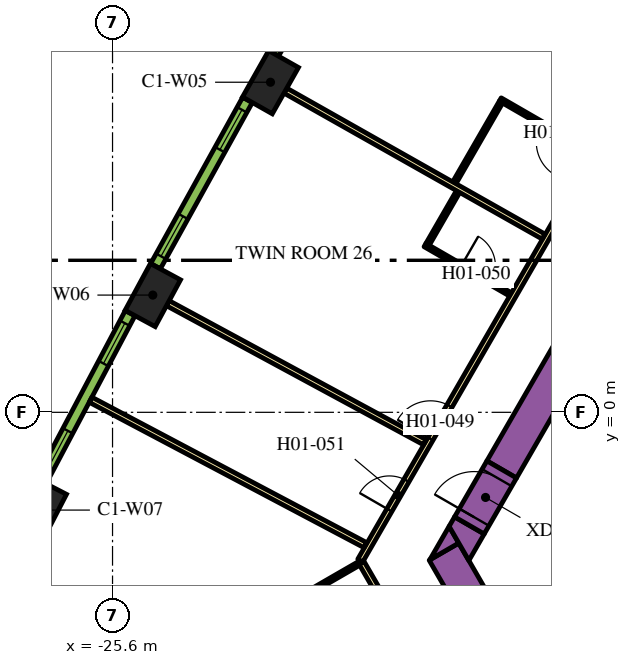
"""IFC4 building model, lengths in metres.
Left out: names, types, materials, properties, quantities, classifications, styles, units other than length and angle.
Written with IfcOpenShell. Run it as: python <this file> out.ifc"""

import sys

from ifc_helpers import new_model, si_unit, direction, frame, frame_2d, origin, origin_2d, place, context, subcontext, project, spatial, polyline, rectangle, outline, extrude, element, fill, save


model = new_model("IFC4")
c1 = context("Model", 3, precision=1e-05, world=origin(), true_north=direction((0.0, 1.0)))
c2 = subcontext(c1, "Body", "Model", "MODEL_VIEW")
j1 = project(units=[si_unit("LENGTHUNIT", "METRE"), si_unit("PLANEANGLEUNIT", "RADIAN")], contexts=[c1])
p1 = place(None, origin())
s1 = spatial("IfcSite", under=j1, at=p1, CompositionType="ELEMENT")
p2 = place(p1, origin())
s2 = spatial("IfcBuilding", under=s1, at=p2, CompositionType="ELEMENT")
p3 = place(p2, frame((0.0, 0.0, 35.4)))
s3 = spatial("IfcBuildingStorey", under=s2, at=p3, CompositionType="ELEMENT", Elevation=35.4)
for number, where, z_axis, x_axis in (
    (1, (-21.443, 8.685, 0.0), (0.0, 0.0, 1.0), (-0.492, -0.871, 0.0)),
    (2, (-24.54, 3.085, 0.0), (0.0, 0.0, 1.0), (-0.476, -0.88, 0.0)),
    (3, (-27.533, -2.572, 0.0), (0.0, 0.0, 1.0), (-0.459, -0.888, 0.0)),
):
    element("IfcColumn", number, at=place(p3, frame(where, z_axis=z_axis, x_axis=x_axis)), inside=s3, PredefinedType="COLUMN", context=c2, shape_type="SweptSolid", body=[
        extrude(rectangle(XDim=1.4, YDim=0.9, at=origin_2d()), origin(), (0.0, 0.0, 1.0), 3.9),
    ])
p4 = place(p3, frame((-15.36, -1.503, 0.0), z_axis=(0.0, 0.0, 1.0), x_axis=(0.50000389221, 0.866023156604, 0.0)))
e4 = element("IfcWall", 4, at=p4, inside=s3, PredefinedType="SOLIDWALL", context=c2, shape_type="SweptSolid", body=[
    extrude(rectangle(XDim=21.0, YDim=0.9, at=frame_2d((10.5, 0.0))), origin(), (0.0, 0.0, 1.0), 3.9),
])
p5 = place(p3, frame((-12.134, -11.883, 0.0), z_axis=(0.0, 0.0, 1.0), x_axis=(-0.500005339912, 0.866022320763, 0.0)))
e5 = element("IfcWall", 5, at=p5, inside=s3, PredefinedType="SOLIDWALL", context=c2, shape_type="SweptSolid", body=[
    extrude(rectangle(XDim=9.488, YDim=0.9, at=frame_2d((4.744, 0.0))), origin(), (0.0, 0.0, 1.0), 3.9),
])
p6 = place(p3, origin())
e6 = element("IfcWall", 6, at=p6, inside=s3, PredefinedType="SOLIDWALL", context=c2, shape_type="SweptSolid", body=[
    extrude(outline(polyline([(-16.489, -3.44), (-17.251, -3.88), (-16.743, -3.0), (-16.489, -3.44)])), origin(), (0.0, 0.0, 1.0), 3.9),
])
e7 = element("IfcWall", 7, at=p6, inside=s3, PredefinedType="SOLIDWALL", context=c2, shape_type="SweptSolid", body=[
    extrude(outline(polyline([(-15.82, -3.201), (-16.223, -3.9), (-16.743, -3.0), (-16.599, -2.751), (-15.82, -3.201)])), origin(), (0.0, 0.0, 1.0), 3.9),
])
p7 = place(p3, frame((-14.44, -6.49, 0.0), z_axis=(0.0, 0.0, 1.0), x_axis=(0.866022966069, 0.500004222222, 0.0)))
e8 = element("IfcWall", 8, at=p7, inside=s3, PredefinedType="SOLIDWALL", context=c2, shape_type="SweptSolid", body=[
    extrude(rectangle(XDim=6.8, YDim=0.25, at=frame_2d((3.4, 0.0))), origin(), (0.0, 0.0, 1.0), 3.9),
])
p8 = place(p3, frame((-16.209, -2.976, 0.0), z_axis=(0.0, 0.0, 1.0), x_axis=(0.499954529098, 0.86605165483, 0.0)))
e9 = element("IfcWall", 9, at=p8, inside=s3, PredefinedType="SOLIDWALL", context=c2, shape_type="SweptSolid", body=[
    extrude(rectangle(XDim=1.7, YDim=0.9, at=frame_2d((0.85, 0.0))), origin(), (0.0, 0.0, 1.0), 3.9),
])
p9 = place(p8, frame((0.25, 0.0, 0.0)))
e10 = element("IfcOpeningElement", 10, at=p9, cuts=e9, PredefinedType="OPENING", context=c2, shape_type="SweptSolid", body=[
    extrude(rectangle(XDim=1.2, YDim=2.1, at=frame_2d((0.6, 1.05))), frame((0.0, 0.46, 0.0), z_axis=(0.0, -1.0, 0.0), x_axis=(1.0, 0.0, 0.0)), (0.0, 0.0, 1.0), 0.92),
])
p10 = place(p3, frame((-19.081, -3.9, 0.0), z_axis=(0.0, 0.0, 1.0), x_axis=(0.499998313975, 0.866026377209, 0.0)))
e11 = element("IfcWall", 11, at=p10, inside=s3, PredefinedType="PARTITIONING", context=c2, shape_type="SweptSolid", body=[
    extrude(rectangle(XDim=25.766, YDim=0.15, at=frame_2d((12.883, 0.0))), origin(), (0.0, 0.0, 1.0), 2.75),
])
p11 = place(p10, frame((24.586, 0.0, 0.0)))
e12 = element("IfcOpeningElement", 12, at=p11, cuts=e11, PredefinedType="OPENING", context=c2, shape_type="SweptSolid", body=[
    extrude(rectangle(XDim=1.0, YDim=2.1, at=frame_2d((0.5, 1.05))), frame((0.0, 0.085, 0.0), z_axis=(0.0, -1.0, 0.0), x_axis=(1.0, 0.0, 0.0)), (0.0, 0.0, 1.0), 0.17),
])
p12 = place(p10, frame((16.196, 0.0, 0.0)))
e13 = element("IfcOpeningElement", 13, at=p12, cuts=e11, PredefinedType="OPENING", context=c2, shape_type="SweptSolid", body=[
    extrude(rectangle(XDim=1.0, YDim=2.1, at=frame_2d((0.5, 1.05))), frame((0.0, 0.085, 0.0), z_axis=(0.0, -1.0, 0.0), x_axis=(1.0, 0.0, 0.0)), (0.0, 0.0, 1.0), 0.17),
])
p13 = place(p10, frame((14.789, 0.0, 0.0)))
e14 = element("IfcOpeningElement", 14, at=p13, cuts=e11, PredefinedType="OPENING", context=c2, shape_type="SweptSolid", body=[
    extrude(rectangle(XDim=1.1, YDim=2.1, at=frame_2d((0.55, 1.05))), frame((0.0, 0.085, 0.0), z_axis=(0.0, -1.0, 0.0), x_axis=(1.0, 0.0, 0.0)), (0.0, 0.0, 1.0), 0.17),
])
p14 = place(p10, frame((3.698, 0.0, 0.0)))
e15 = element("IfcOpeningElement", 15, at=p14, cuts=e11, PredefinedType="OPENING", context=c2, shape_type="SweptSolid", body=[
    extrude(rectangle(XDim=1.0, YDim=2.1, at=frame_2d((0.5, 1.05))), frame((0.0, 0.085, 0.0), z_axis=(0.0, -1.0, 0.0), x_axis=(1.0, 0.0, 0.0)), (0.0, 0.0, 1.0), 0.17),
])
p15 = place(p10, frame((1.531, 0.0, 0.0)))
e16 = element("IfcOpeningElement", 16, at=p15, cuts=e11, PredefinedType="OPENING", context=c2, shape_type="SweptSolid", body=[
    extrude(rectangle(XDim=0.9, YDim=2.1, at=frame_2d((0.45, 1.05))), frame((0.0, 0.085, 0.0), z_axis=(0.0, -1.0, 0.0), x_axis=(1.0, 0.0, 0.0)), (0.0, 0.0, 1.0), 0.17),
])
p16 = place(p3, frame((-16.412, -8.523, 0.0), z_axis=(0.0, 0.0, 1.0), x_axis=(-0.500001929737, 0.866024289647, 0.0)))
e17 = element("IfcWall", 17, at=p16, inside=s3, PredefinedType="PARTITIONING", context=c2, shape_type="SweptSolid", body=[
    extrude(rectangle(XDim=5.268, YDim=0.15, at=frame_2d((2.634, 0.0))), origin(), (0.0, 0.0, 1.0), 2.75),
])
p17 = place(p16, frame((0.226, 0.0, 0.0)))
e18 = element("IfcOpeningElement", 18, at=p17, cuts=e17, PredefinedType="OPENING", context=c2, shape_type="SweptSolid", body=[
    extrude(rectangle(XDim=1.0, YDim=2.1, at=frame_2d((0.5, 1.05))), frame((0.0, 0.085, 0.0), z_axis=(0.0, -1.0, 0.0), x_axis=(1.0, 0.0, 0.0)), (0.0, 0.0, 1.0), 0.17),
])
p18 = place(p3, frame((-26.178, 0.331, 0.0), z_axis=(0.0, 0.0, 1.0), x_axis=(0.883908370409, -0.467660125221, 0.0)))
e19 = element("IfcWall", 19, at=p18, inside=s3, PredefinedType="PARTITIONING", context=c2, shape_type="SweptSolid", body=[
    extrude(rectangle(XDim=8.182, YDim=0.15, at=frame_2d((4.091, 0.0))), origin(), (0.0, 0.0, 1.0), 2.75),
])
p19 = place(p3, frame((-24.145, 2.871, 0.0), z_axis=(0.0, 0.0, 1.0), x_axis=(0.879551725039, -0.475803281809, 0.0)))
e20 = element("IfcWall", 20, at=p19, inside=s3, PredefinedType="PARTITIONING", context=c2, shape_type="SweptSolid", body=[
    extrude(rectangle(XDim=7.688, YDim=0.15, at=frame_2d((3.844, 0.0))), origin(), (0.0, 0.0, 1.0), 2.75),
])
p20 = place(p3, frame((-21.052, 8.464, 0.0), z_axis=(0.0, 0.0, 1.0), x_axis=(0.87059371954, -0.492002617368, 0.0)))
e21 = element("IfcWall", 21, at=p20, inside=s3, PredefinedType="PARTITIONING", context=c2, shape_type="SweptSolid", body=[
    extrude(rectangle(XDim=7.803, YDim=0.15, at=frame_2d((3.902, 0.0))), origin(), (0.0, 0.0, 1.0), 2.75),
])
p21 = place(p3, frame((-12.972, 6.831, 0.0), z_axis=(0.0, 0.0, 1.0), x_axis=(-0.866018616679, 0.500011755427, 0.0)))
e22 = element("IfcWall", 22, at=p21, inside=s3, PredefinedType="PARTITIONING", context=c2, shape_type="SweptSolid", body=[
    extrude(rectangle(XDim=2.8, YDim=0.1, at=frame_2d((1.4, 0.0))), origin(), (0.0, 0.0, 1.0), 2.75),
])
p22 = place(p21, frame((0.55, 0.0, 0.0)))
e23 = element("IfcOpeningElement", 23, at=p22, cuts=e22, PredefinedType="OPENING", context=c2, shape_type="SweptSolid", body=[
    extrude(rectangle(XDim=1.0, YDim=2.1, at=frame_2d((0.5, 1.05))), frame((0.0, 0.06, 0.0), z_axis=(0.0, -1.0, 0.0), x_axis=(1.0, 0.0, 0.0)), (0.0, 0.0, 1.0), 0.12),
])
p23 = place(p3, frame((-15.379, 8.163, 0.0), z_axis=(0.0, 0.0, 1.0), x_axis=(-0.499987006516, -0.866032905446, 0.0)))
e24 = element("IfcWall", 24, at=p23, inside=s3, PredefinedType="PARTITIONING", context=c2, shape_type="SweptSolid", body=[
    extrude(rectangle(XDim=2.45, YDim=0.1, at=frame_2d((1.225, 0.0))), origin(), (0.0, 0.0, 1.0), 2.75),
])
p24 = place(p3, frame((-17.378, 4.401, 0.0), z_axis=(0.0, 0.0, 1.0), x_axis=(0.865997922154, -0.500047596559, 0.0)))
e25 = element("IfcWall", 25, at=p24, inside=s3, PredefinedType="PARTITIONING", context=c2, shape_type="SweptSolid", body=[
    extrude(rectangle(XDim=2.6, YDim=0.1, at=frame_2d((1.3, 0.0))), origin(), (0.0, 0.0, 1.0), 2.75),
])
p25 = place(p24, frame((1.1, 0.0, 0.0)))
e26 = element("IfcOpeningElement", 26, at=p25, cuts=e25, PredefinedType="OPENING", context=c2, shape_type="SweptSolid", body=[
    extrude(rectangle(XDim=0.9, YDim=2.1, at=frame_2d((0.45, 1.05))), frame((0.0, 0.06, 0.0), z_axis=(0.0, -1.0, 0.0), x_axis=(1.0, 0.0, 0.0)), (0.0, 0.0, 1.0), 0.12),
])
p26 = place(p3, frame((-17.309, 4.419, 0.0), z_axis=(0.0, 0.0, 1.0), x_axis=(0.499880961361, 0.866094119867, 0.0)))
e27 = element("IfcWall", 27, at=p26, inside=s3, PredefinedType="PARTITIONING", context=c2, shape_type="SweptSolid", body=[
    extrude(rectangle(XDim=1.6, YDim=0.1, at=frame_2d((0.8, 0.0))), origin(), (0.0, 0.0, 1.0), 2.75),
])
p27 = place(p3, frame((-19.121, -3.981, 0.0), z_axis=(0.0, 0.0, 1.0), x_axis=(-0.866021400173, -0.500006934395, 0.0)))
e28 = element("IfcWall", 28, at=p27, inside=s3, PredefinedType="PARTITIONING", context=c2, shape_type="SweptSolid", body=[
    extrude(rectangle(XDim=2.6, YDim=0.1, at=frame_2d((1.3, 0.0))), origin(), (0.0, 0.0, 1.0), 2.75),
])
p28 = place(p3, frame((-18.858, 13.773, 0.0), z_axis=(0.0, 0.0, 1.0), x_axis=(-0.50002123722, -0.866013142123, 0.0)))
e29 = element("IfcWall", 29, at=p28, inside=s3, PredefinedType="SOLIDWALL", context=c2, shape_type="SweptSolid", body=[
    extrude(rectangle(XDim=4.998, YDim=0.29, at=frame_2d((2.499, 0.0))), origin(), (0.0, 0.0, 1.0), 3.65),
])
p29 = place(p28, frame((0.297, 0.0, 0.9)))
e30 = element("IfcOpeningElement", 30, at=p29, cuts=e29, PredefinedType="OPENING", context=c2, shape_type="SweptSolid", body=[
    extrude(rectangle(XDim=1.2, YDim=2.15, at=frame_2d((0.6, 1.075))), frame((0.0, 0.155, 0.0), z_axis=(0.0, -1.0, 0.0), x_axis=(1.0, 0.0, 0.0)), (0.0, 0.0, 1.0), 0.31),
])
p30 = place(p28, frame((3.501, 0.0, 0.9)))
e31 = element("IfcOpeningElement", 31, at=p30, cuts=e29, PredefinedType="OPENING", context=c2, shape_type="SweptSolid", body=[
    extrude(rectangle(XDim=1.2, YDim=2.15, at=frame_2d((0.6, 1.075))), frame((0.0, 0.155, 0.0), z_axis=(0.0, -1.0, 0.0), x_axis=(1.0, 0.0, 0.0)), (0.0, 0.0, 1.0), 0.31),
])
p31 = place(p3, frame((-22.05, 8.22, 0.0), z_axis=(0.0, 0.0, 1.0), x_axis=(-0.483912572871, -0.875116347589, 0.0)))
e32 = element("IfcWall", 32, at=p31, inside=s3, PredefinedType="SOLIDWALL", context=c2, shape_type="SweptSolid", body=[
    extrude(rectangle(XDim=4.998, YDim=0.29, at=frame_2d((2.499, 0.0))), origin(), (0.0, 0.0, 1.0), 3.65),
])
p32 = place(p31, frame((0.297, 0.0, 0.9)))
e33 = element("IfcOpeningElement", 33, at=p32, cuts=e32, PredefinedType="OPENING", context=c2, shape_type="SweptSolid", body=[
    extrude(rectangle(XDim=1.2, YDim=2.15, at=frame_2d((0.6, 1.075))), frame((0.0, 0.155, 0.0), z_axis=(0.0, -1.0, 0.0), x_axis=(1.0, 0.0, 0.0)), (0.0, 0.0, 1.0), 0.31),
])
p33 = place(p31, frame((3.501, 0.0, 0.9)))
e34 = element("IfcOpeningElement", 34, at=p33, cuts=e32, PredefinedType="OPENING", context=c2, shape_type="SweptSolid", body=[
    extrude(rectangle(XDim=1.2, YDim=2.15, at=frame_2d((0.6, 1.075))), frame((0.0, 0.155, 0.0), z_axis=(0.0, -1.0, 0.0), x_axis=(1.0, 0.0, 0.0)), (0.0, 0.0, 1.0), 0.31),
])
p34 = place(p3, frame((-25.138, 2.608, 0.0), z_axis=(0.0, 0.0, 1.0), x_axis=(-0.467629620899, -0.883924509026, 0.0)))
e35 = element("IfcWall", 35, at=p34, inside=s3, PredefinedType="SOLIDWALL", context=c2, shape_type="SweptSolid", body=[
    extrude(rectangle(XDim=4.998, YDim=0.29, at=frame_2d((2.499, 0.0))), origin(), (0.0, 0.0, 1.0), 3.65),
])
p35 = place(p34, frame((0.297, 0.0, 0.9)))
e36 = element("IfcOpeningElement", 36, at=p35, cuts=e35, PredefinedType="OPENING", context=c2, shape_type="SweptSolid", body=[
    extrude(rectangle(XDim=1.2, YDim=2.15, at=frame_2d((0.6, 1.075))), frame((0.0, 0.155, 0.0), z_axis=(0.0, -1.0, 0.0), x_axis=(1.0, 0.0, 0.0)), (0.0, 0.0, 1.0), 0.31),
])
p36 = place(p34, frame((3.501, 0.0, 0.9)))
e37 = element("IfcOpeningElement", 37, at=p36, cuts=e35, PredefinedType="OPENING", context=c2, shape_type="SweptSolid", body=[
    extrude(rectangle(XDim=1.2, YDim=2.15, at=frame_2d((0.6, 1.075))), frame((0.0, 0.155, 0.0), z_axis=(0.0, -1.0, 0.0), x_axis=(1.0, 0.0, 0.0)), (0.0, 0.0, 1.0), 0.31),
])
p37 = place(p9, origin())
e38 = element("IfcDoor", 38, at=p37, inside=s3, OperationType="SINGLE_SWING_LEFT", PredefinedType="DOOR", context=c2, shape_type="SweptSolid", body=[
    extrude(rectangle(XDim=1.2, YDim=2.1, at=frame_2d((0.6, 1.05))), frame((0.0, 0.025, 0.0), z_axis=(0.0, -1.0, 0.0), x_axis=(1.0, 0.0, 0.0)), (0.0, 0.0, 1.0), 0.05),
])
fill(e10, e38)
p38 = place(p22, origin())
e39 = element("IfcDoor", 39, at=p38, inside=s3, OperationType="SINGLE_SWING_LEFT", PredefinedType="DOOR", context=c2, shape_type="SweptSolid", body=[
    extrude(rectangle(XDim=1.0, YDim=2.1, at=frame_2d((0.5, 1.05))), frame((0.0, 0.025, 0.0), z_axis=(0.0, -1.0, 0.0), x_axis=(1.0, 0.0, 0.0)), (0.0, 0.0, 1.0), 0.05),
])
fill(e23, e39)
p39 = place(p14, origin())
e40 = element("IfcDoor", 40, at=p39, inside=s3, OperationType="SINGLE_SWING_LEFT", PredefinedType="DOOR", context=c2, shape_type="SweptSolid", body=[
    extrude(rectangle(XDim=1.0, YDim=2.1, at=frame_2d((0.5, 1.05))), frame((0.0, 0.025, 0.0), z_axis=(0.0, -1.0, 0.0), x_axis=(1.0, 0.0, 0.0)), (0.0, 0.0, 1.0), 0.05),
])
fill(e15, e40)
p40 = place(p25, origin())
e41 = element("IfcDoor", 41, at=p40, inside=s3, OperationType="SINGLE_SWING_LEFT", PredefinedType="DOOR", context=c2, shape_type="SweptSolid", body=[
    extrude(rectangle(XDim=0.9, YDim=2.1, at=frame_2d((0.45, 1.05))), frame((0.0, 0.025, 0.0), z_axis=(0.0, -1.0, 0.0), x_axis=(1.0, 0.0, 0.0)), (0.0, 0.0, 1.0), 0.05),
])
fill(e26, e41)
p41 = place(p15, origin())
e42 = element("IfcDoor", 42, at=p41, inside=s3, OperationType="SINGLE_SWING_LEFT", PredefinedType="DOOR", context=c2, shape_type="SweptSolid", body=[
    extrude(rectangle(XDim=0.9, YDim=2.1, at=frame_2d((0.45, 1.05))), frame((0.0, 0.025, 0.0), z_axis=(0.0, -1.0, 0.0), x_axis=(1.0, 0.0, 0.0)), (0.0, 0.0, 1.0), 0.05),
])
fill(e16, e42)
p42 = place(p32, origin())
e43 = element("IfcWindow", 43, at=p42, inside=s3, PartitioningType="DOUBLE_PANEL_VERTICAL", PredefinedType="WINDOW", context=c2, shape_type="SweptSolid", body=[
    extrude(rectangle(XDim=1.2, YDim=2.15, at=frame_2d((0.6, 1.075))), frame((0.0, 0.015, 0.0), z_axis=(0.0, -1.0, 0.0), x_axis=(1.0, 0.0, 0.0)), (0.0, 0.0, 1.0), 0.06),
])
fill(e33, e43)
p43 = place(p33, origin())
e44 = element("IfcWindow", 44, at=p43, inside=s3, PartitioningType="DOUBLE_PANEL_VERTICAL", PredefinedType="WINDOW", context=c2, shape_type="SweptSolid", body=[
    extrude(rectangle(XDim=1.2, YDim=2.15, at=frame_2d((0.6, 1.075))), frame((0.0, 0.015, 0.0), z_axis=(0.0, -1.0, 0.0), x_axis=(1.0, 0.0, 0.0)), (0.0, 0.0, 1.0), 0.06),
])
fill(e34, e44)
p44 = place(p35, origin())
e45 = element("IfcWindow", 45, at=p44, inside=s3, PartitioningType="DOUBLE_PANEL_VERTICAL", PredefinedType="WINDOW", context=c2, shape_type="SweptSolid", body=[
    extrude(rectangle(XDim=1.2, YDim=2.15, at=frame_2d((0.6, 1.075))), frame((0.0, 0.015, 0.0), z_axis=(0.0, -1.0, 0.0), x_axis=(1.0, 0.0, 0.0)), (0.0, 0.0, 1.0), 0.06),
])
fill(e36, e45)
p45 = place(p36, origin())
e46 = element("IfcWindow", 46, at=p45, inside=s3, PartitioningType="DOUBLE_PANEL_VERTICAL", PredefinedType="WINDOW", context=c2, shape_type="SweptSolid", body=[
    extrude(rectangle(XDim=1.2, YDim=2.15, at=frame_2d((0.6, 1.075))), frame((0.0, 0.015, 0.0), z_axis=(0.0, -1.0, 0.0), x_axis=(1.0, 0.0, 0.0)), (0.0, 0.0, 1.0), 0.06),
])
fill(e37, e46)
save(model, sys.argv[1])
